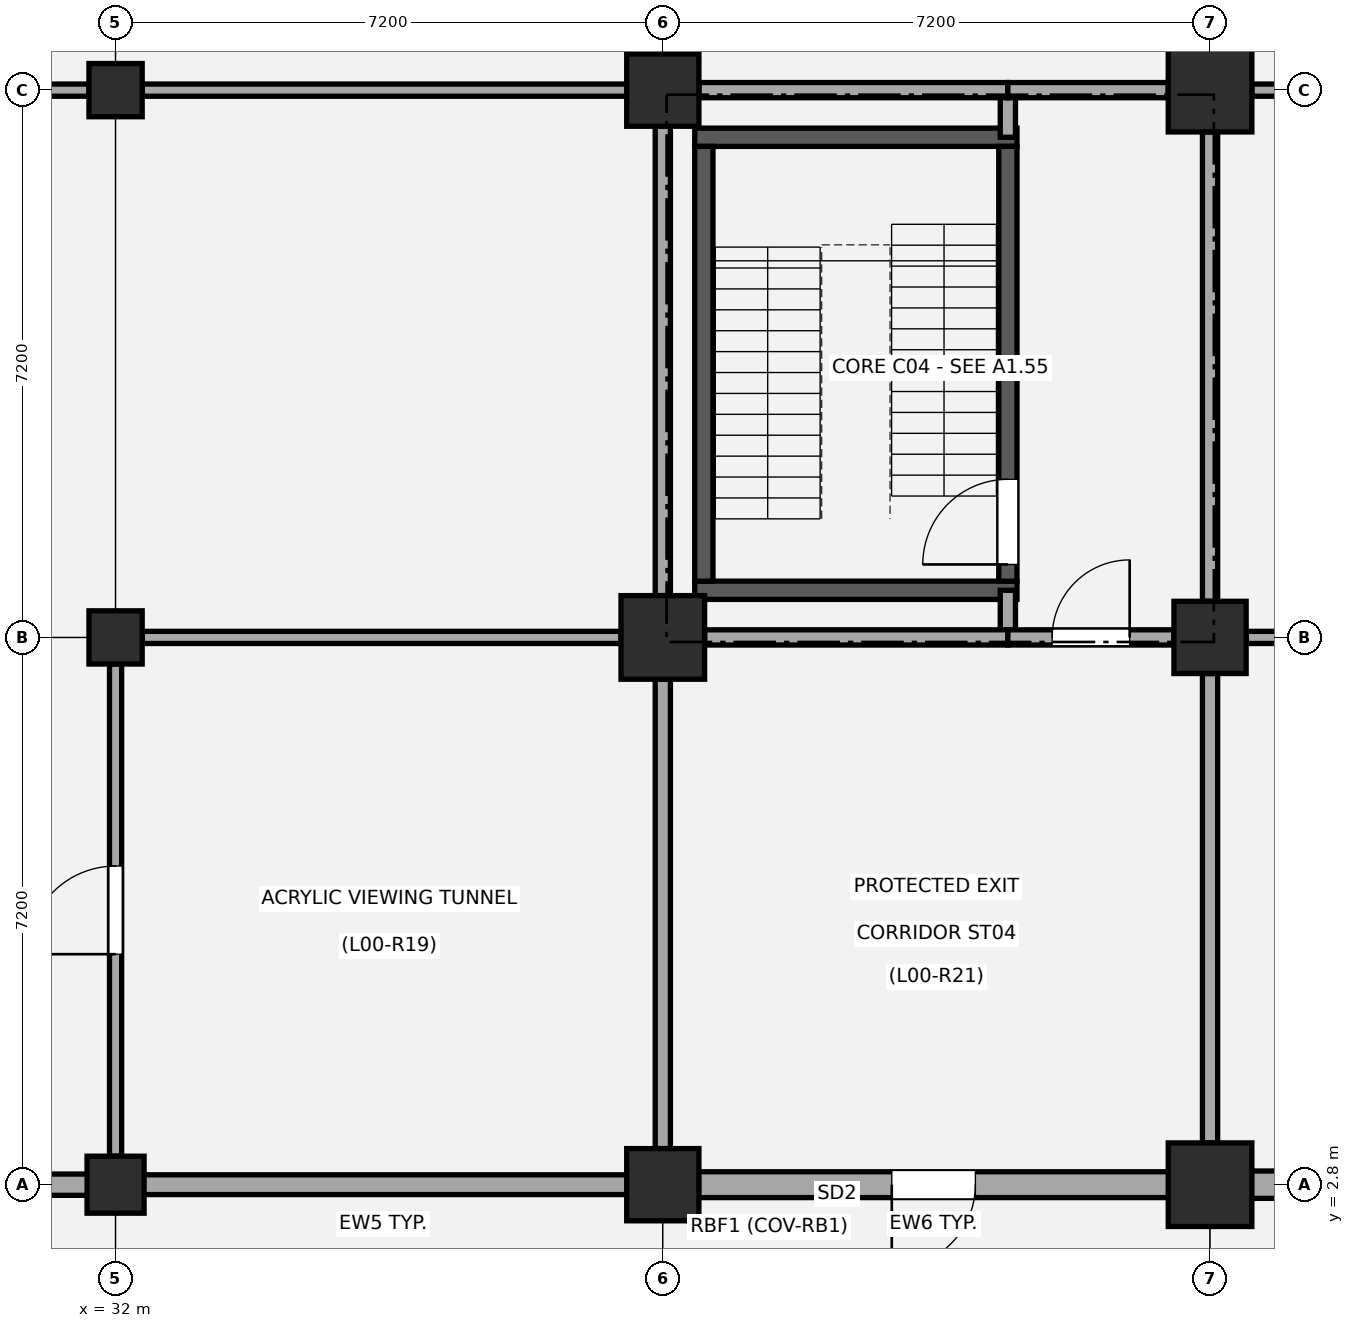
"""IFC4 building model, lengths in metres.
Left out: names, types, materials, properties, quantities, classifications, styles, units other than length and angle.
Written with IfcOpenShell. Run it as: python <this file> out.ifc"""

import sys

from ifc_helpers import new_model, si_unit, direction, frame, frame_2d, origin, origin_2d, place, context, subcontext, project, spatial, rectangle, circle, extrude, element, fill, save


model = new_model("IFC4")
c1 = context("Model", 3, precision=1e-05, world=origin(), true_north=direction((0.0, 1.0)))
c2 = subcontext(c1, "Body", "Model", "MODEL_VIEW")
j1 = project(units=[si_unit("LENGTHUNIT", "METRE"), si_unit("PLANEANGLEUNIT", "RADIAN")], contexts=[c1])
p1 = place(None, origin())
s1 = spatial("IfcSite", under=j1, at=p1, CompositionType="ELEMENT")
p2 = place(p1, origin())
s2 = spatial("IfcBuilding", under=s1, at=p2, CompositionType="ELEMENT")
p3 = place(p2, origin())
s3 = spatial("IfcBuildingStorey", under=s2, at=p3, CompositionType="ELEMENT", Elevation=0.0)
p4 = place(p3, frame((32.0, 2.8, -0.35), z_axis=(0.0, 0.0, 1.0), x_axis=(1.0, 0.0, 0.0)))
e1 = element("IfcColumn", 1, at=p4, inside=s3, PredefinedType="COLUMN", context=c2, shape_type="SweptSolid", body=[
    extrude(circle(Radius=0.375, at=origin_2d()), origin(), (0.0, 0.0, 1.0), 5.03),
])
for number, where, z_axis, x_axis in (
    (2, (32.0, 10.0, -0.35), (0.0, 0.0, 1.0), (1.0, 0.0, 0.0)),
    (3, (32.0, 17.2, -0.35), (0.0, 0.0, 1.0), (1.0, 0.0, 0.0)),
):
    element("IfcColumn", number, at=place(p3, frame(where, z_axis=z_axis, x_axis=x_axis)), inside=s3, PredefinedType="COLUMN", context=c2, shape_type="SweptSolid", body=[
        extrude(rectangle(XDim=0.7, YDim=0.7, at=origin_2d()), origin(), (0.0, 0.0, 1.0), 5.03),
    ])
p5 = place(p3, frame((39.2, 2.8, -0.35), z_axis=(0.0, 0.0, 1.0), x_axis=(1.0, 0.0, 0.0)))
e4 = element("IfcColumn", 4, at=p5, inside=s3, PredefinedType="COLUMN", context=c2, shape_type="SweptSolid", body=[
    extrude(rectangle(XDim=0.95, YDim=0.95, at=origin_2d()), origin(), (0.0, 0.0, 1.0), 5.03),
])
p6 = place(p3, frame((39.2, 10.0, -0.35), z_axis=(0.0, 0.0, 1.0), x_axis=(1.0, 0.0, 0.0)))
e5 = element("IfcColumn", 5, at=p6, inside=s3, PredefinedType="COLUMN", context=c2, shape_type="SweptSolid", body=[
    extrude(rectangle(XDim=1.1, YDim=1.1, at=origin_2d()), origin(), (0.0, 0.0, 1.0), 5.03),
])
p7 = place(p3, frame((39.2, 17.2, -0.35), z_axis=(0.0, 0.0, 1.0), x_axis=(1.0, 0.0, 0.0)))
e6 = element("IfcColumn", 6, at=p7, inside=s3, PredefinedType="COLUMN", context=c2, shape_type="SweptSolid", body=[
    extrude(rectangle(XDim=0.95, YDim=0.95, at=origin_2d()), origin(), (0.0, 0.0, 1.0), 5.03),
])
p8 = place(p3, frame((46.4, 2.8, -0.35), z_axis=(0.0, 0.0, 1.0), x_axis=(1.0, 0.0, 0.0)))
e7 = element("IfcColumn", 7, at=p8, inside=s3, PredefinedType="COLUMN", context=c2, shape_type="SweptSolid", body=[
    extrude(rectangle(XDim=1.1, YDim=1.1, at=origin_2d()), origin(), (0.0, 0.0, 1.0), 5.03),
])
p9 = place(p3, frame((46.4, 10.0, -0.35), z_axis=(0.0, 0.0, 1.0), x_axis=(1.0, 0.0, 0.0)))
e8 = element("IfcColumn", 8, at=p9, inside=s3, PredefinedType="COLUMN", context=c2, shape_type="SweptSolid", body=[
    extrude(rectangle(XDim=0.95, YDim=0.95, at=origin_2d()), origin(), (0.0, 0.0, 1.0), 5.03),
])
p10 = place(p3, frame((46.4, 17.2, -0.35), z_axis=(0.0, 0.0, 1.0), x_axis=(1.0, 0.0, 0.0)))
e9 = element("IfcColumn", 9, at=p10, inside=s3, PredefinedType="COLUMN", context=c2, shape_type="SweptSolid", body=[
    extrude(rectangle(XDim=1.1, YDim=1.1, at=origin_2d()), origin(), (0.0, 0.0, 1.0), 5.03),
])
p11 = place(p3, frame((31.69, 2.8, 0.0), z_axis=(0.0, 0.0, 1.0), x_axis=(-1.0, 0.0, 0.0)))
e10 = element("IfcWall", 10, at=p11, inside=s3, PredefinedType="STANDARD", context=c2, shape_type="SweptSolid", body=[
    extrude(rectangle(XDim=6.58, YDim=0.28, at=frame_2d((3.29, 0.0))), origin(), (0.0, 0.0, 1.0), 3.67),
])
p12 = place(p11, frame((2.37, 0.0, 0.0)))
e11 = element("IfcOpeningElement", 11, at=p12, cuts=e10, PredefinedType="OPENING", context=c2, shape_type="SweptSolid", body=[
    extrude(rectangle(XDim=1.84, YDim=2.22, at=frame_2d((0.92, 1.11))), frame((0.0, 0.15, 0.0), z_axis=(0.0, -1.0, 0.0), x_axis=(1.0, 0.0, 0.0)), (0.0, 0.0, 1.0), 0.3),
])
p13 = place(p3, frame((38.73, 2.8, 0.0), z_axis=(0.0, 0.0, 1.0), x_axis=(-1.0, 0.0, 0.0)))
e12 = element("IfcWall", 12, at=p13, inside=s3, PredefinedType="STANDARD", context=c2, shape_type="SweptSolid", body=[
    extrude(rectangle(XDim=6.42, YDim=0.26, at=frame_2d((3.21, 0.0))), origin(), (0.0, 0.0, 1.0), 3.67),
])
p14 = place(p3, frame((45.855, 2.8, 0.0), z_axis=(0.0, 0.0, 1.0), x_axis=(-1.0, 0.0, 0.0)))
e13 = element("IfcWall", 13, at=p14, inside=s3, PredefinedType="STANDARD", context=c2, shape_type="SweptSolid", body=[
    extrude(rectangle(XDim=6.185, YDim=0.34, at=frame_2d((3.093, 0.0))), origin(), (0.0, 0.0, 1.0), 2.47),
])
p15 = place(p14, frame((2.542, 0.0, 0.0)))
e14 = element("IfcOpeningElement", 14, at=p15, cuts=e13, PredefinedType="OPENING", context=c2, shape_type="SweptSolid", body=[
    extrude(rectangle(XDim=1.1, YDim=2.15, at=frame_2d((0.55, 1.075))), frame((0.0, 0.18, 0.0), z_axis=(0.0, -1.0, 0.0), x_axis=(1.0, 0.0, 0.0)), (0.0, 0.0, 1.0), 0.36),
])
p16 = place(p3, frame((53.13, 2.8, 0.0), z_axis=(0.0, 0.0, 1.0), x_axis=(-1.0, 0.0, 0.0)))
e15 = element("IfcWall", 15, at=p16, inside=s3, PredefinedType="STANDARD", context=c2, shape_type="SweptSolid", body=[
    extrude(rectangle(XDim=6.185, YDim=0.36, at=frame_2d((3.092, 0.0))), origin(), (0.0, 0.0, 1.0), 2.37),
])
for number, where, z_axis, x_axis in (
    (16, (39.62, 10.62, 0.0), (0.0, 0.0, 1.0), (1.0, 0.0, 0.0)),
    (17, (39.62, 16.58, 0.0), (0.0, 0.0, 1.0), (1.0, 0.0, 0.0)),
):
    element("IfcWall", number, at=place(p3, frame(where, z_axis=z_axis, x_axis=x_axis)), inside=s3, PredefinedType="SHEAR", context=c2, shape_type="SweptSolid", body=[
        extrude(rectangle(XDim=4.24, YDim=0.24, at=frame_2d((2.12, 0.0))), origin(), (0.0, 0.0, 1.0), 3.48),
    ])
p17 = place(p3, frame((39.74, 10.74, 0.0), z_axis=(0.0, 0.0, 1.0), x_axis=(0.0, 1.0, 0.0)))
e18 = element("IfcWall", 18, at=p17, inside=s3, PredefinedType="SHEAR", context=c2, shape_type="SweptSolid", body=[
    extrude(rectangle(XDim=5.72, YDim=0.24, at=frame_2d((2.86, 0.0))), origin(), (0.0, 0.0, 1.0), 3.48),
])
p18 = place(p3, frame((43.74, 10.74, 0.0), z_axis=(0.0, 0.0, 1.0), x_axis=(0.0, 1.0, 0.0)))
e19 = element("IfcWall", 19, at=p18, inside=s3, PredefinedType="SHEAR", context=c2, shape_type="SweptSolid", body=[
    extrude(rectangle(XDim=5.72, YDim=0.24, at=frame_2d((2.86, 0.0))), origin(), (0.0, 0.0, 1.0), 3.48),
])
p19 = place(p18, frame((0.22, 0.0, 0.0)))
e20 = element("IfcOpeningElement", 20, at=p19, cuts=e19, PredefinedType="OPENING", context=c2, shape_type="SweptSolid", body=[
    extrude(rectangle(XDim=1.12, YDim=2.15, at=frame_2d((0.56, 1.075))), frame((0.0, 0.13, 0.0), z_axis=(0.0, -1.0, 0.0), x_axis=(1.0, 0.0, 0.0)), (0.0, 0.0, 1.0), 0.26),
])
p20 = place(p3, frame((43.74, 10.0, 0.0), z_axis=(0.0, 0.0, 1.0), x_axis=(0.0, 1.0, 0.0)))
e21 = element("IfcWall", 21, at=p20, inside=s3, PredefinedType="PARTITIONING", context=c2, shape_type="SweptSolid", body=[
    extrude(rectangle(XDim=0.62, YDim=0.2, at=frame_2d((0.31, 0.0))), origin(), (0.0, 0.0, 1.0), 2.47),
])
p21 = place(p3, frame((43.74, 16.58, 0.0), z_axis=(0.0, 0.0, 1.0), x_axis=(0.0, 1.0, 0.0)))
e22 = element("IfcWall", 22, at=p21, inside=s3, PredefinedType="PARTITIONING", context=c2, shape_type="SweptSolid", body=[
    extrude(rectangle(XDim=0.62, YDim=0.2, at=frame_2d((0.31, 0.0))), origin(), (0.0, 0.0, 1.0), 2.47),
])
p22 = place(p3, frame((39.2, 10.55, 0.0), z_axis=(0.0, 0.0, 1.0), x_axis=(0.0, 1.0, 0.0)))
e23 = element("IfcWall", 23, at=p22, inside=s3, PredefinedType="PARTITIONING", context=c2, shape_type="SweptSolid", body=[
    extrude(rectangle(XDim=6.175, YDim=0.2, at=frame_2d((3.087, 0.0))), origin(), (0.0, 0.0, 1.0), 2.47),
])
p23 = place(p3, frame((46.4, 10.475, 0.0), z_axis=(0.0, 0.0, 1.0), x_axis=(0.0, 1.0, 0.0)))
e24 = element("IfcWall", 24, at=p23, inside=s3, PredefinedType="PARTITIONING", context=c2, shape_type="SweptSolid", body=[
    extrude(rectangle(XDim=6.175, YDim=0.2, at=frame_2d((3.087, 0.0))), origin(), (0.0, 0.0, 1.0), 2.47),
])
p24 = place(p3, frame((39.75, 10.0, 0.0), z_axis=(0.0, 0.0, 1.0), x_axis=(1.0, 0.0, 0.0)))
e25 = element("IfcWall", 25, at=p24, inside=s3, PredefinedType="PARTITIONING", context=c2, shape_type="SweptSolid", body=[
    extrude(rectangle(XDim=3.99, YDim=0.2, at=frame_2d((1.995, 0.0))), origin(), (0.0, 0.0, 1.0), 2.47),
])
p25 = place(p3, frame((43.74, 10.0, 0.0), z_axis=(0.0, 0.0, 1.0), x_axis=(1.0, 0.0, 0.0)))
e26 = element("IfcWall", 26, at=p25, inside=s3, PredefinedType="PARTITIONING", context=c2, shape_type="SweptSolid", body=[
    extrude(rectangle(XDim=2.185, YDim=0.2, at=frame_2d((1.093, 0.0))), origin(), (0.0, 0.0, 1.0), 2.47),
])
p26 = place(p25, frame((0.583, 0.0, 0.0)))
e27 = element("IfcOpeningElement", 27, at=p26, cuts=e26, PredefinedType="OPENING", context=c2, shape_type="SweptSolid", body=[
    extrude(rectangle(XDim=1.02, YDim=2.15, at=frame_2d((0.51, 1.075))), frame((0.0, 0.11, 0.0), z_axis=(0.0, -1.0, 0.0), x_axis=(1.0, 0.0, 0.0)), (0.0, 0.0, 1.0), 0.22),
])
p27 = place(p3, frame((39.675, 17.2, 0.0), z_axis=(0.0, 0.0, 1.0), x_axis=(1.0, 0.0, 0.0)))
e28 = element("IfcWall", 28, at=p27, inside=s3, PredefinedType="PARTITIONING", context=c2, shape_type="SweptSolid", body=[
    extrude(rectangle(XDim=4.065, YDim=0.2, at=frame_2d((2.032, 0.0))), origin(), (0.0, 0.0, 1.0), 2.47),
])
p28 = place(p3, frame((43.74, 17.2, 0.0), z_axis=(0.0, 0.0, 1.0), x_axis=(1.0, 0.0, 0.0)))
e29 = element("IfcWall", 29, at=p28, inside=s3, PredefinedType="PARTITIONING", context=c2, shape_type="SweptSolid", body=[
    extrude(rectangle(XDim=2.11, YDim=0.2, at=frame_2d((1.055, 0.0))), origin(), (0.0, 0.0, 1.0), 2.47),
])
p29 = place(p3, frame((32.0, 3.175, 0.0), z_axis=(0.0, 0.0, 1.0), x_axis=(0.0, 1.0, 0.0)))
e30 = element("IfcWall", 30, at=p29, inside=s3, PredefinedType="PARTITIONING", context=c2, shape_type="SweptSolid", body=[
    extrude(rectangle(XDim=6.475, YDim=0.16, at=frame_2d((3.237, 0.0))), origin(), (0.0, 0.0, 1.0), 3.62),
])
p30 = place(p29, frame((2.657, 0.0, 0.0)))
e31 = element("IfcOpeningElement", 31, at=p30, cuts=e30, PredefinedType="OPENING", context=c2, shape_type="SweptSolid", body=[
    extrude(rectangle(XDim=1.16, YDim=2.18, at=frame_2d((0.58, 1.09))), frame((0.0, 0.09, 0.0), z_axis=(0.0, -1.0, 0.0), x_axis=(1.0, 0.0, 0.0)), (0.0, 0.0, 1.0), 0.18),
])
p31 = place(p3, frame((25.15, 17.2, 0.0), z_axis=(0.0, 0.0, 1.0), x_axis=(1.0, 0.0, 0.0)))
e32 = element("IfcWall", 32, at=p31, inside=s3, PredefinedType="PARTITIONING", context=c2, shape_type="SweptSolid", body=[
    extrude(rectangle(XDim=6.5, YDim=0.16, at=frame_2d((3.25, 0.0))), origin(), (0.0, 0.0, 1.0), 3.62),
])
p32 = place(p3, frame((39.2, 3.275, 0.0), z_axis=(0.0, 0.0, 1.0), x_axis=(0.0, 1.0, 0.0)))
e33 = element("IfcWall", 33, at=p32, inside=s3, PredefinedType="PARTITIONING", context=c2, shape_type="SweptSolid", body=[
    extrude(rectangle(XDim=6.175, YDim=0.2, at=frame_2d((3.087, 0.0))), origin(), (0.0, 0.0, 1.0), 2.47),
])
p33 = place(p3, frame((32.35, 10.0, 0.0), z_axis=(0.0, 0.0, 1.0), x_axis=(1.0, 0.0, 0.0)))
e34 = element("IfcWall", 34, at=p33, inside=s3, PredefinedType="PARTITIONING", context=c2, shape_type="SweptSolid", body=[
    extrude(rectangle(XDim=6.3, YDim=0.16, at=frame_2d((3.15, 0.0))), origin(), (0.0, 0.0, 1.0), 3.62),
])
p34 = place(p3, frame((32.35, 17.2, 0.0), z_axis=(0.0, 0.0, 1.0), x_axis=(1.0, 0.0, 0.0)))
e35 = element("IfcWall", 35, at=p34, inside=s3, PredefinedType="PARTITIONING", context=c2, shape_type="SweptSolid", body=[
    extrude(rectangle(XDim=6.375, YDim=0.16, at=frame_2d((3.188, 0.0))), origin(), (0.0, 0.0, 1.0), 3.52),
])
p35 = place(p3, frame((46.4, 3.35, 0.0), z_axis=(0.0, 0.0, 1.0), x_axis=(0.0, 1.0, 0.0)))
e36 = element("IfcWall", 36, at=p35, inside=s3, PredefinedType="PARTITIONING", context=c2, shape_type="SweptSolid", body=[
    extrude(rectangle(XDim=6.175, YDim=0.2, at=frame_2d((3.087, 0.0))), origin(), (0.0, 0.0, 1.0), 2.47),
])
p36 = place(p3, frame((46.875, 10.0, 0.0), z_axis=(0.0, 0.0, 1.0), x_axis=(1.0, 0.0, 0.0)))
e37 = element("IfcWall", 37, at=p36, inside=s3, PredefinedType="PARTITIONING", context=c2, shape_type="SweptSolid", body=[
    extrude(rectangle(XDim=6.175, YDim=0.16, at=frame_2d((3.087, 0.0))), origin(), (0.0, 0.0, 1.0), 2.37),
])
p37 = place(p36, frame((2.258, 0.0, 0.0)))
e38 = element("IfcOpeningElement", 38, at=p37, cuts=e37, PredefinedType="OPENING", context=c2, shape_type="SweptSolid", body=[
    extrude(rectangle(XDim=1.66, YDim=2.22, at=frame_2d((0.83, 1.11))), frame((0.0, 0.09, 0.0), z_axis=(0.0, -1.0, 0.0), x_axis=(1.0, 0.0, 0.0)), (0.0, 0.0, 1.0), 0.18),
])
p38 = place(p3, frame((46.95, 17.2, 0.0), z_axis=(0.0, 0.0, 1.0), x_axis=(1.0, 0.0, 0.0)))
e39 = element("IfcWall", 39, at=p38, inside=s3, PredefinedType="PARTITIONING", context=c2, shape_type="SweptSolid", body=[
    extrude(rectangle(XDim=6.175, YDim=0.16, at=frame_2d((3.087, 0.0))), origin(), (0.0, 0.0, 1.0), 2.37),
])
p39 = place(p38, frame((2.607, 0.0, 0.0)))
e40 = element("IfcOpeningElement", 40, at=p39, cuts=e39, PredefinedType="OPENING", context=c2, shape_type="SweptSolid", body=[
    extrude(rectangle(XDim=0.96, YDim=2.1, at=frame_2d((0.48, 1.05))), frame((0.0, 0.09, 0.0), z_axis=(0.0, -1.0, 0.0), x_axis=(1.0, 0.0, 0.0)), (0.0, 0.0, 1.0), 0.18),
])
p40 = place(p15, origin())
e41 = element("IfcDoor", 41, at=p40, inside=s3, OperationType="SINGLE_SWING_RIGHT", PredefinedType="DOOR", context=c2, shape_type="SweptSolid", body=[
    extrude(rectangle(XDim=1.1, YDim=2.15, at=frame_2d((0.55, 1.075))), frame((0.0, 0.025, 0.0), z_axis=(0.0, -1.0, 0.0), x_axis=(1.0, 0.0, 0.0)), (0.0, 0.0, 1.0), 0.05),
])
fill(e14, e41)
p41 = place(p19, origin())
e42 = element("IfcDoor", 42, at=p41, inside=s3, OperationType="SINGLE_SWING_LEFT", PredefinedType="DOOR", context=c2, shape_type="SweptSolid", body=[
    extrude(rectangle(XDim=1.12, YDim=2.15, at=frame_2d((0.56, 1.075))), frame((0.0, 0.025, 0.0), z_axis=(0.0, -1.0, 0.0), x_axis=(1.0, 0.0, 0.0)), (0.0, 0.0, 1.0), 0.05),
])
fill(e20, e42)
p42 = place(p26, origin())
e43 = element("IfcDoor", 43, at=p42, inside=s3, OperationType="SINGLE_SWING_RIGHT", PredefinedType="DOOR", context=c2, shape_type="SweptSolid", body=[
    extrude(rectangle(XDim=1.02, YDim=2.15, at=frame_2d((0.51, 1.075))), frame((0.0, 0.025, 0.0), z_axis=(0.0, -1.0, 0.0), x_axis=(1.0, 0.0, 0.0)), (0.0, 0.0, 1.0), 0.05),
])
fill(e27, e43)
p43 = place(p30, origin())
e44 = element("IfcDoor", 44, at=p43, inside=s3, OperationType="SINGLE_SWING_LEFT", PredefinedType="DOOR", context=c2, shape_type="SweptSolid", body=[
    extrude(rectangle(XDim=1.16, YDim=2.18, at=frame_2d((0.58, 1.09))), frame((0.0, 0.025, 0.0), z_axis=(0.0, -1.0, 0.0), x_axis=(1.0, 0.0, 0.0)), (0.0, 0.0, 1.0), 0.05),
])
fill(e31, e44)
save(model, sys.argv[1])
